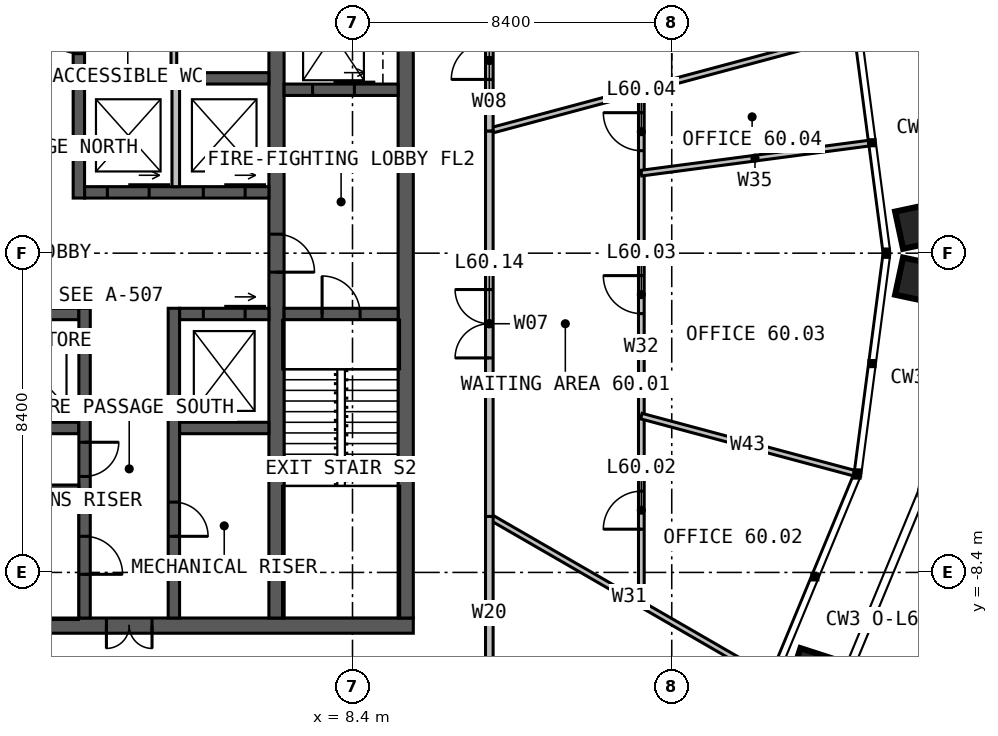
"""IFC4 building model, lengths in metres.
Left out: names, types, materials, properties, quantities, classifications, styles, units other than length and angle.
Written with IfcOpenShell. Run it as: python <this file> out.ifc"""

import sys

from ifc_helpers import new_model, si_unit, direction, frame, frame_2d, origin, place, context, subcontext, project, spatial, rectangle, extrude, element, fill, save


model = new_model("IFC4")
c1 = context("Model", 3, precision=1e-05, world=origin(), true_north=direction((0.0, 1.0)))
c2 = subcontext(c1, "Body", "Model", "MODEL_VIEW")
j1 = project(units=[si_unit("LENGTHUNIT", "METRE"), si_unit("PLANEANGLEUNIT", "RADIAN")], contexts=[c1])
p1 = place(None, origin())
s1 = spatial("IfcSite", under=j1, at=p1, CompositionType="ELEMENT")
p2 = place(p1, origin())
s2 = spatial("IfcBuilding", under=s1, at=p2, CompositionType="ELEMENT")
p3 = place(p2, frame((0.0, 0.0, 248.0)))
s3 = spatial("IfcBuildingStorey", under=s2, at=p3, CompositionType="ELEMENT", Elevation=248.0)
p4 = place(p3, frame((10.0, -9.8, 0.0), z_axis=(0.0, 0.0, 1.0), x_axis=(-1.0, 0.0, 0.0)))
e1 = element("IfcWall", 1, at=p4, inside=s3, PredefinedType="SOLIDWALL", context=c2, shape_type="SweptSolid", body=[
    extrude(rectangle(XDim=20.0, YDim=0.4, at=frame_2d((10.0, 0.0))), origin(), (0.0, 0.0, 1.0), 4.0),
])
p5 = place(p4, frame((6.875, 0.0, 0.0)))
e2 = element("IfcOpeningElement", 2, at=p5, cuts=e1, PredefinedType="OPENING", context=c2, shape_type="SweptSolid", body=[
    extrude(rectangle(XDim=1.2, YDim=2.2, at=frame_2d((0.6, 1.1))), frame((0.0, 0.21, 0.0), z_axis=(0.0, -1.0, 0.0), x_axis=(1.0, 0.0, 0.0)), (0.0, 0.0, 1.0), 0.42),
])
p6 = place(p3, frame((9.8, -9.6, 0.0), z_axis=(0.0, 0.0, 1.0), x_axis=(0.0, 1.0, 0.0)))
e3 = element("IfcWall", 3, at=p6, inside=s3, PredefinedType="SOLIDWALL", context=c2, shape_type="SweptSolid", body=[
    extrude(rectangle(XDim=19.2, YDim=0.4, at=frame_2d((9.6, 0.0))), origin(), (0.0, 0.0, 1.0), 4.0),
])
p7 = place(p3, frame((6.4, 9.6, 0.0), z_axis=(0.0, 0.0, 1.0), x_axis=(0.0, -1.0, 0.0)))
e4 = element("IfcWall", 4, at=p7, inside=s3, PredefinedType="SOLIDWALL", context=c2, shape_type="SweptSolid", body=[
    extrude(rectangle(XDim=19.2, YDim=0.4, at=frame_2d((9.6, 0.0))), origin(), (0.0, 0.0, 1.0), 4.0),
])
p8 = place(p7, frame((9.1, 0.0, 0.0)))
e5 = element("IfcOpeningElement", 5, at=p8, cuts=e4, PredefinedType="OPENING", context=c2, shape_type="SweptSolid", body=[
    extrude(rectangle(XDim=1.0, YDim=2.2, at=frame_2d((0.5, 1.1))), frame((0.0, 0.21, 0.0), z_axis=(0.0, -1.0, 0.0), x_axis=(1.0, 0.0, 0.0)), (0.0, 0.0, 1.0), 0.42),
])
p9 = place(p3, frame((1.35, 1.6, 0.0), z_axis=(0.0, 0.0, 1.0), x_axis=(1.0, 0.0, 0.0)))
e6 = element("IfcWall", 6, at=p9, inside=s3, PredefinedType="SOLIDWALL", context=c2, shape_type="SweptSolid", body=[
    extrude(rectangle(XDim=4.85, YDim=0.3, at=frame_2d((2.425, 0.0))), origin(), (0.0, 0.0, 1.0), 4.0),
])
p10 = place(p9, frame((0.6, 0.0, 0.0)))
e7 = element("IfcOpeningElement", 7, at=p10, cuts=e6, PredefinedType="OPENING", context=c2, shape_type="SweptSolid", body=[
    extrude(rectangle(XDim=1.1, YDim=2.2, at=frame_2d((0.55, 1.1))), frame((0.0, 0.16, 0.0), z_axis=(0.0, -1.0, 0.0), x_axis=(1.0, 0.0, 0.0)), (0.0, 0.0, 1.0), 0.32),
])
p11 = place(p9, frame((3.125, 0.0, 0.0)))
e8 = element("IfcOpeningElement", 8, at=p11, cuts=e6, PredefinedType="OPENING", context=c2, shape_type="SweptSolid", body=[
    extrude(rectangle(XDim=1.1, YDim=2.2, at=frame_2d((0.55, 1.1))), frame((0.0, 0.16, 0.0), z_axis=(0.0, -1.0, 0.0), x_axis=(1.0, 0.0, 0.0)), (0.0, 0.0, 1.0), 0.32),
])
p12 = place(p3, frame((1.35, 4.6, 0.0), z_axis=(0.0, 0.0, 1.0), x_axis=(1.0, 0.0, 0.0)))
e9 = element("IfcWall", 9, at=p12, inside=s3, PredefinedType="SOLIDWALL", context=c2, shape_type="SweptSolid", body=[
    extrude(rectangle(XDim=4.85, YDim=0.3, at=frame_2d((2.425, 0.0))), origin(), (0.0, 0.0, 1.0), 4.0),
])
p13 = place(p3, frame((1.2, 1.45, 0.0), z_axis=(0.0, 0.0, 1.0), x_axis=(0.0, 1.0, 0.0)))
e10 = element("IfcWall", 10, at=p13, inside=s3, PredefinedType="SOLIDWALL", context=c2, shape_type="SweptSolid", body=[
    extrude(rectangle(XDim=8.15, YDim=0.3, at=frame_2d((4.075, 0.0))), origin(), (0.0, 0.0, 1.0), 4.0),
])
p14 = place(p13, frame((3.8, 0.0, 0.0)))
e11 = element("IfcOpeningElement", 11, at=p14, cuts=e10, PredefinedType="OPENING", context=c2, shape_type="SweptSolid", body=[
    extrude(rectangle(XDim=1.0, YDim=2.2, at=frame_2d((0.5, 1.1))), frame((0.0, 0.16, 0.0), z_axis=(0.0, -1.0, 0.0), x_axis=(1.0, 0.0, 0.0)), (0.0, 0.0, 1.0), 0.32),
])
p15 = place(p13, frame((6.15, 0.0, 0.0)))
e12 = element("IfcOpeningElement", 12, at=p15, cuts=e10, PredefinedType="OPENING", context=c2, shape_type="SweptSolid", body=[
    extrude(rectangle(XDim=1.0, YDim=2.2, at=frame_2d((0.5, 1.1))), frame((0.0, 0.16, 0.0), z_axis=(0.0, -1.0, 0.0), x_axis=(1.0, 0.0, 0.0)), (0.0, 0.0, 1.0), 0.32),
])
p16 = place(p3, frame((-6.2, -1.6, 0.0), z_axis=(0.0, 0.0, 1.0), x_axis=(1.0, 0.0, 0.0)))
e13 = element("IfcWall", 13, at=p16, inside=s3, PredefinedType="SOLIDWALL", context=c2, shape_type="SweptSolid", body=[
    extrude(rectangle(XDim=7.4, YDim=0.3, at=frame_2d((3.7, 0.0))), origin(), (0.0, 0.0, 1.0), 4.0),
])
p17 = place(p16, frame((0.675, 0.0, 0.0)))
e14 = element("IfcOpeningElement", 14, at=p17, cuts=e13, PredefinedType="OPENING", context=c2, shape_type="SweptSolid", body=[
    extrude(rectangle(XDim=1.0, YDim=2.2, at=frame_2d((0.5, 1.1))), frame((0.0, 0.16, 0.0), z_axis=(0.0, -1.0, 0.0), x_axis=(1.0, 0.0, 0.0)), (0.0, 0.0, 1.0), 0.32),
])
p18 = place(p16, frame((2.225, 0.0, 0.0)))
e15 = element("IfcOpeningElement", 15, at=p18, cuts=e13, PredefinedType="OPENING", context=c2, shape_type="SweptSolid", body=[
    extrude(rectangle(XDim=1.0, YDim=2.2, at=frame_2d((0.5, 1.1))), frame((0.0, 0.16, 0.0), z_axis=(0.0, -1.0, 0.0), x_axis=(1.0, 0.0, 0.0)), (0.0, 0.0, 1.0), 0.32),
])
p19 = place(p16, frame((3.695, 0.0, 0.0)))
e16 = element("IfcOpeningElement", 16, at=p19, cuts=e13, PredefinedType="OPENING", context=c2, shape_type="SweptSolid", body=[
    extrude(rectangle(XDim=1.0, YDim=2.2, at=frame_2d((0.5, 1.1))), frame((0.0, 0.16, 0.0), z_axis=(0.0, -1.0, 0.0), x_axis=(1.0, 0.0, 0.0)), (0.0, 0.0, 1.0), 0.32),
])
p20 = place(p3, frame((3.85, -1.6, 0.0), z_axis=(0.0, 0.0, 1.0), x_axis=(1.0, 0.0, 0.0)))
e17 = element("IfcWall", 17, at=p20, inside=s3, PredefinedType="SOLIDWALL", context=c2, shape_type="SweptSolid", body=[
    extrude(rectangle(XDim=2.35, YDim=0.3, at=frame_2d((1.175, 0.0))), origin(), (0.0, 0.0, 1.0), 4.0),
])
p21 = place(p20, frame((0.625, 0.0, 0.0)))
e18 = element("IfcOpeningElement", 18, at=p21, cuts=e17, PredefinedType="OPENING", context=c2, shape_type="SweptSolid", body=[
    extrude(rectangle(XDim=1.1, YDim=2.2, at=frame_2d((0.55, 1.1))), frame((0.0, 0.16, 0.0), z_axis=(0.0, -1.0, 0.0), x_axis=(1.0, 0.0, 0.0)), (0.0, 0.0, 1.0), 0.32),
])
p22 = place(p3, frame((-6.2, -4.6, 0.0), z_axis=(0.0, 0.0, 1.0), x_axis=(1.0, 0.0, 0.0)))
e19 = element("IfcWall", 19, at=p22, inside=s3, PredefinedType="SOLIDWALL", context=c2, shape_type="SweptSolid", body=[
    extrude(rectangle(XDim=7.4, YDim=0.3, at=frame_2d((3.7, 0.0))), origin(), (0.0, 0.0, 1.0), 4.0),
])
p23 = place(p3, frame((3.85, -4.6, 0.0), z_axis=(0.0, 0.0, 1.0), x_axis=(1.0, 0.0, 0.0)))
e20 = element("IfcWall", 20, at=p23, inside=s3, PredefinedType="SOLIDWALL", context=c2, shape_type="SweptSolid", body=[
    extrude(rectangle(XDim=2.35, YDim=0.3, at=frame_2d((1.175, 0.0))), origin(), (0.0, 0.0, 1.0), 4.0),
])
p24 = place(p3, frame((1.35, -1.45, 0.0), z_axis=(0.0, 0.0, 1.0), x_axis=(0.0, -1.0, 0.0)))
e21 = element("IfcWall", 21, at=p24, inside=s3, PredefinedType="SOLIDWALL", context=c2, shape_type="SweptSolid", body=[
    extrude(rectangle(XDim=8.15, YDim=0.3, at=frame_2d((4.075, 0.0))), origin(), (0.0, 0.0, 1.0), 4.0),
])
p25 = place(p24, frame((6.0, 0.0, 0.0)))
e22 = element("IfcOpeningElement", 22, at=p25, cuts=e21, PredefinedType="OPENING", context=c2, shape_type="SweptSolid", body=[
    extrude(rectangle(XDim=1.0, YDim=2.2, at=frame_2d((0.5, 1.1))), frame((0.0, 0.16, 0.0), z_axis=(0.0, -1.0, 0.0), x_axis=(1.0, 0.0, 0.0)), (0.0, 0.0, 1.0), 0.32),
])
p26 = place(p24, frame((3.525, 0.0, 0.0)))
e23 = element("IfcOpeningElement", 23, at=p26, cuts=e21, PredefinedType="OPENING", context=c2, shape_type="SweptSolid", body=[
    extrude(rectangle(XDim=0.9, YDim=2.2, at=frame_2d((0.45, 1.1))), frame((0.0, 0.16, 0.0), z_axis=(0.0, -1.0, 0.0), x_axis=(1.0, 0.0, 0.0)), (0.0, 0.0, 1.0), 0.32),
])
p27 = place(p3, frame((3.7, -1.45, 0.0), z_axis=(0.0, 0.0, 1.0), x_axis=(0.0, -1.0, 0.0)))
e24 = element("IfcWall", 24, at=p27, inside=s3, PredefinedType="SOLIDWALL", context=c2, shape_type="SweptSolid", body=[
    extrude(rectangle(XDim=8.15, YDim=0.3, at=frame_2d((4.075, 0.0))), origin(), (0.0, 0.0, 1.0), 4.0),
])
p28 = place(p27, frame((5.1, 0.0, 0.0)))
e25 = element("IfcOpeningElement", 25, at=p28, cuts=e24, PredefinedType="OPENING", context=c2, shape_type="SweptSolid", body=[
    extrude(rectangle(XDim=0.9, YDim=2.2, at=frame_2d((0.45, 1.1))), frame((0.0, 0.16, 0.0), z_axis=(0.0, -1.0, 0.0), x_axis=(1.0, 0.0, 0.0)), (0.0, 0.0, 1.0), 0.32),
])
p29 = place(p3, frame((-6.2, -6.2, 0.0), z_axis=(0.0, 0.0, 1.0), x_axis=(1.0, 0.0, 0.0)))
e26 = element("IfcWall", 26, at=p29, inside=s3, PredefinedType="SOLIDWALL", context=c2, shape_type="SweptSolid", body=[
    extrude(rectangle(XDim=7.4, YDim=0.2, at=frame_2d((3.7, 0.0))), origin(), (0.0, 0.0, 1.0), 4.0),
])
p30 = place(p3, frame((6.6, -1.6, 0.0), z_axis=(0.0, 0.0, 1.0), x_axis=(1.0, 0.0, 0.0)))
e27 = element("IfcWall", 27, at=p30, inside=s3, PredefinedType="SOLIDWALL", context=c2, shape_type="SweptSolid", body=[
    extrude(rectangle(XDim=3.0, YDim=0.3, at=frame_2d((1.5, 0.0))), origin(), (0.0, 0.0, 1.0), 4.0),
])
p31 = place(p30, frame((1.0, 0.0, 0.0)))
e28 = element("IfcOpeningElement", 28, at=p31, cuts=e27, PredefinedType="OPENING", context=c2, shape_type="SweptSolid", body=[
    extrude(rectangle(XDim=1.0, YDim=2.2, at=frame_2d((0.5, 1.1))), frame((0.0, 0.16, 0.0), z_axis=(0.0, -1.0, 0.0), x_axis=(1.0, 0.0, 0.0)), (0.0, 0.0, 1.0), 0.32),
])
p32 = place(p3, frame((6.6, 4.3, 0.0), z_axis=(0.0, 0.0, 1.0), x_axis=(1.0, 0.0, 0.0)))
e29 = element("IfcWall", 29, at=p32, inside=s3, PredefinedType="SOLIDWALL", context=c2, shape_type="SweptSolid", body=[
    extrude(rectangle(XDim=3.0, YDim=0.3, at=frame_2d((1.5, 0.0))), origin(), (0.0, 0.0, 1.0), 4.0),
])
p33 = place(p32, frame((0.75, 0.0, 0.0)))
e30 = element("IfcOpeningElement", 30, at=p33, cuts=e29, PredefinedType="OPENING", context=c2, shape_type="SweptSolid", body=[
    extrude(rectangle(XDim=1.1, YDim=2.2, at=frame_2d((0.55, 1.1))), frame((0.0, 0.16, 0.0), z_axis=(0.0, -1.0, 0.0), x_axis=(1.0, 0.0, 0.0)), (0.0, 0.0, 1.0), 0.32),
])
p34 = place(p3, frame((3.75, 1.75, 0.0), z_axis=(0.0, 0.0, 1.0), x_axis=(0.0, 1.0, 0.0)))
e31 = element("IfcWall", 31, at=p34, inside=s3, PredefinedType="SOLIDWALL", context=c2, shape_type="SweptSolid", body=[
    extrude(rectangle(XDim=2.7, YDim=0.2, at=frame_2d((1.35, 0.0))), origin(), (0.0, 0.0, 1.0), 3.75),
])
p35 = place(p3, frame((3.7, 4.75, 0.0), z_axis=(0.0, 0.0, 1.0), x_axis=(0.0, 1.0, 0.0)))
e32 = element("IfcWall", 32, at=p35, inside=s3, PredefinedType="PARTITIONING", context=c2, shape_type="SweptSolid", body=[
    extrude(rectangle(XDim=1.975, YDim=0.15, at=frame_2d((0.988, 0.0))), origin(), (0.0, 0.0, 1.0), 3.75),
])
p36 = place(p3, frame((12.0, -6.928, 0.0), z_axis=(0.0, 0.0, 1.0), x_axis=(0.866026401553, -0.49999827181, 0.0)))
e33 = element("IfcWall", 33, at=p36, inside=s3, PredefinedType="PARTITIONING", context=c2, shape_type="SweptSolid", body=[
    extrude(rectangle(XDim=8.505, YDim=0.15, at=frame_2d((4.252, 0.0))), origin(), (0.0, 0.0, 1.0), 2.79),
])
p37 = place(p3, frame((12.0, 3.215, 0.0), z_axis=(0.0, 0.0, 1.0), x_axis=(0.965922720407, 0.258830636135, 0.0)))
e34 = element("IfcWall", 34, at=p37, inside=s3, PredefinedType="PARTITIONING", context=c2, shape_type="SweptSolid", body=[
    extrude(rectangle(XDim=9.938, YDim=0.15, at=frame_2d((4.969, 0.0))), origin(), (0.0, 0.0, 1.0), 2.79),
])
p38 = place(p3, frame((16.0, -9.238, 0.0), z_axis=(0.0, 0.0, 1.0), x_axis=(0.0, 1.0, 0.0)))
e35 = element("IfcWall", 35, at=p38, inside=s3, PredefinedType="PARTITIONING", context=c2, shape_type="SweptSolid", body=[
    extrude(rectangle(XDim=13.525, YDim=0.15, at=frame_2d((6.762, 0.0))), origin(), (0.0, 0.0, 1.0), 2.79),
])
p39 = place(p38, frame((1.975, 0.0, 0.0)))
e36 = element("IfcOpeningElement", 36, at=p39, cuts=e35, PredefinedType="OPENING", context=c2, shape_type="SweptSolid", body=[
    extrude(rectangle(XDim=1.0, YDim=2.2, at=frame_2d((0.5, 1.1))), frame((0.0, 0.085, 0.0), z_axis=(0.0, -1.0, 0.0), x_axis=(1.0, 0.0, 0.0)), (0.0, 0.0, 1.0), 0.17),
])
p40 = place(p38, frame((7.647, 0.0, 0.0)))
e37 = element("IfcOpeningElement", 37, at=p40, cuts=e35, PredefinedType="OPENING", context=c2, shape_type="SweptSolid", body=[
    extrude(rectangle(XDim=1.0, YDim=2.2, at=frame_2d((0.5, 1.1))), frame((0.0, 0.085, 0.0), z_axis=(0.0, -1.0, 0.0), x_axis=(1.0, 0.0, 0.0)), (0.0, 0.0, 1.0), 0.17),
])
p41 = place(p38, frame((11.934, 0.0, 0.0)))
e38 = element("IfcOpeningElement", 38, at=p41, cuts=e35, PredefinedType="OPENING", context=c2, shape_type="SweptSolid", body=[
    extrude(rectangle(XDim=1.0, YDim=2.2, at=frame_2d((0.5, 1.1))), frame((0.0, 0.085, 0.0), z_axis=(0.0, -1.0, 0.0), x_axis=(1.0, 0.0, 0.0)), (0.0, 0.0, 1.0), 0.17),
])
p42 = place(p3, frame((16.0, -4.287, 0.0), z_axis=(0.0, 0.0, 1.0), x_axis=(0.96591966376, -0.258842042881, 0.0)))
e39 = element("IfcWall", 39, at=p42, inside=s3, PredefinedType="PARTITIONING", context=c2, shape_type="SweptSolid", body=[
    extrude(rectangle(XDim=5.797, YDim=0.15, at=frame_2d((2.898, 0.0))), origin(), (0.0, 0.0, 1.0), 2.79),
])
p43 = place(p3, frame((16.0, 2.106, 0.0), z_axis=(0.0, 0.0, 1.0), x_axis=(0.991443960057, 0.130533038219, 0.0)))
e40 = element("IfcWall", 40, at=p43, inside=s3, PredefinedType="PARTITIONING", context=c2, shape_type="SweptSolid", body=[
    extrude(rectangle(XDim=6.032, YDim=0.15, at=frame_2d((3.016, 0.0))), origin(), (0.0, 0.0, 1.0), 2.79),
])
p44 = place(p3, frame((12.0, -6.928, 0.0), z_axis=(0.0, 0.0, 1.0), x_axis=(0.0, 1.0, 0.0)))
e41 = element("IfcWall", 41, at=p44, inside=s3, PredefinedType="PARTITIONING", context=c2, shape_type="SweptSolid", body=[
    extrude(rectangle(XDim=10.144, YDim=0.2, at=frame_2d((5.072, 0.0))), origin(), (0.0, 0.0, 1.0), 3.8),
])
p45 = place(p44, frame((4.172, 0.0, 0.0)))
e42 = element("IfcOpeningElement", 42, at=p45, cuts=e41, PredefinedType="OPENING", context=c2, shape_type="SweptSolid", body=[
    extrude(rectangle(XDim=1.8, YDim=2.2, at=frame_2d((0.9, 1.1))), frame((0.0, 0.11, 0.0), z_axis=(0.0, -1.0, 0.0), x_axis=(1.0, 0.0, 0.0)), (0.0, 0.0, 1.0), 0.22),
])
p46 = place(p3, frame((12.0, 3.215, 0.0), z_axis=(0.0, 0.0, 1.0), x_axis=(0.0, 1.0, 0.0)))
e43 = element("IfcWall", 43, at=p46, inside=s3, PredefinedType="PARTITIONING", context=c2, shape_type="SweptSolid", body=[
    extrude(rectangle(XDim=3.713, YDim=0.2, at=frame_2d((1.856, 0.0))), origin(), (0.0, 0.0, 1.0), 3.8),
])
p47 = place(p46, frame((1.356, 0.0, 0.0)))
e44 = element("IfcOpeningElement", 44, at=p47, cuts=e43, PredefinedType="OPENING", context=c2, shape_type="SweptSolid", body=[
    extrude(rectangle(XDim=1.0, YDim=2.2, at=frame_2d((0.5, 1.1))), frame((0.0, 0.11, 0.0), z_axis=(0.0, -1.0, 0.0), x_axis=(1.0, 0.0, 0.0)), (0.0, 0.0, 1.0), 0.22),
])
p48 = place(p3, frame((12.0, -12.0, 0.0), z_axis=(0.0, 0.0, 1.0), x_axis=(0.0, 1.0, 0.0)))
e45 = element("IfcWall", 45, at=p48, inside=s3, PredefinedType="PARTITIONING", context=c2, shape_type="SweptSolid", body=[
    extrude(rectangle(XDim=5.072, YDim=0.2, at=frame_2d((2.536, 0.0))), origin(), (0.0, 0.0, 1.0), 3.8),
])
p49 = place(p5, origin())
e46 = element("IfcDoor", 46, at=p49, inside=s3, OperationType="DOUBLE_DOOR_SINGLE_SWING", PredefinedType="DOOR", context=c2, shape_type="SweptSolid", body=[
    extrude(rectangle(XDim=1.2, YDim=2.2, at=frame_2d((0.6, 1.1))), frame((0.0, 0.025, 0.0), z_axis=(0.0, -1.0, 0.0), x_axis=(1.0, 0.0, 0.0)), (0.0, 0.0, 1.0), 0.05),
])
fill(e2, e46)
p50 = place(p8, origin())
e47 = element("IfcDoor", 47, at=p50, inside=s3, OperationType="SINGLE_SWING_RIGHT", PredefinedType="DOOR", context=c2, shape_type="SweptSolid", body=[
    extrude(rectangle(XDim=1.0, YDim=2.2, at=frame_2d((0.5, 1.1))), frame((0.0, 0.025, 0.0), z_axis=(0.0, -1.0, 0.0), x_axis=(1.0, 0.0, 0.0)), (0.0, 0.0, 1.0), 0.05),
])
fill(e5, e47)
p51 = place(p31, origin())
e48 = element("IfcDoor", 48, at=p51, inside=s3, OperationType="SINGLE_SWING_LEFT", PredefinedType="DOOR", context=c2, shape_type="SweptSolid", body=[
    extrude(rectangle(XDim=1.0, YDim=2.2, at=frame_2d((0.5, 1.1))), frame((0.0, 0.025, 0.0), z_axis=(0.0, -1.0, 0.0), x_axis=(1.0, 0.0, 0.0)), (0.0, 0.0, 1.0), 0.05),
])
fill(e28, e48)
p52 = place(p25, origin())
e49 = element("IfcDoor", 49, at=p52, inside=s3, OperationType="SINGLE_SWING_RIGHT", PredefinedType="DOOR", context=c2, shape_type="SweptSolid", body=[
    extrude(rectangle(XDim=1.0, YDim=2.2, at=frame_2d((0.5, 1.1))), frame((0.0, 0.025, 0.0), z_axis=(0.0, -1.0, 0.0), x_axis=(1.0, 0.0, 0.0)), (0.0, 0.0, 1.0), 0.05),
])
fill(e22, e49)
p53 = place(p14, origin())
e50 = element("IfcDoor", 50, at=p53, inside=s3, OperationType="SINGLE_SWING_RIGHT", PredefinedType="DOOR", context=c2, shape_type="SweptSolid", body=[
    extrude(rectangle(XDim=1.0, YDim=2.2, at=frame_2d((0.5, 1.1))), frame((0.0, 0.025, 0.0), z_axis=(0.0, -1.0, 0.0), x_axis=(1.0, 0.0, 0.0)), (0.0, 0.0, 1.0), 0.05),
])
fill(e11, e50)
p54 = place(p26, origin())
e51 = element("IfcDoor", 51, at=p54, inside=s3, OperationType="SINGLE_SWING_LEFT", PredefinedType="DOOR", context=c2, shape_type="SweptSolid", body=[
    extrude(rectangle(XDim=0.9, YDim=2.2, at=frame_2d((0.45, 1.1))), frame((0.0, 0.025, 0.0), z_axis=(0.0, -1.0, 0.0), x_axis=(1.0, 0.0, 0.0)), (0.0, 0.0, 1.0), 0.05),
])
fill(e23, e51)
p55 = place(p28, origin())
e52 = element("IfcDoor", 52, at=p55, inside=s3, OperationType="SINGLE_SWING_RIGHT", PredefinedType="DOOR", context=c2, shape_type="SweptSolid", body=[
    extrude(rectangle(XDim=0.9, YDim=2.2, at=frame_2d((0.45, 1.1))), frame((0.0, 0.025, 0.0), z_axis=(0.0, -1.0, 0.0), x_axis=(1.0, 0.0, 0.0)), (0.0, 0.0, 1.0), 0.05),
])
fill(e25, e52)
p56 = place(p10, origin())
e53 = element("IfcDoor", 53, at=p56, inside=s3, OperationType="SLIDING_TO_LEFT", PredefinedType="DOOR", context=c2, shape_type="SweptSolid", body=[
    extrude(rectangle(XDim=1.1, YDim=2.2, at=frame_2d((0.55, 1.1))), frame((0.0, 0.025, 0.0), z_axis=(0.0, -1.0, 0.0), x_axis=(1.0, 0.0, 0.0)), (0.0, 0.0, 1.0), 0.05),
])
fill(e7, e53)
p57 = place(p11, origin())
e54 = element("IfcDoor", 54, at=p57, inside=s3, OperationType="SLIDING_TO_LEFT", PredefinedType="DOOR", context=c2, shape_type="SweptSolid", body=[
    extrude(rectangle(XDim=1.1, YDim=2.2, at=frame_2d((0.55, 1.1))), frame((0.0, 0.025, 0.0), z_axis=(0.0, -1.0, 0.0), x_axis=(1.0, 0.0, 0.0)), (0.0, 0.0, 1.0), 0.05),
])
fill(e8, e54)
p58 = place(p21, origin())
e55 = element("IfcDoor", 55, at=p58, inside=s3, OperationType="SLIDING_TO_LEFT", PredefinedType="DOOR", context=c2, shape_type="SweptSolid", body=[
    extrude(rectangle(XDim=1.1, YDim=2.2, at=frame_2d((0.55, 1.1))), frame((0.0, 0.025, 0.0), z_axis=(0.0, -1.0, 0.0), x_axis=(1.0, 0.0, 0.0)), (0.0, 0.0, 1.0), 0.05),
])
fill(e18, e55)
p59 = place(p33, origin())
e56 = element("IfcDoor", 56, at=p59, inside=s3, OperationType="SLIDING_TO_LEFT", PredefinedType="DOOR", context=c2, shape_type="SweptSolid", body=[
    extrude(rectangle(XDim=1.1, YDim=2.2, at=frame_2d((0.55, 1.1))), frame((0.0, 0.025, 0.0), z_axis=(0.0, -1.0, 0.0), x_axis=(1.0, 0.0, 0.0)), (0.0, 0.0, 1.0), 0.05),
])
fill(e30, e56)
p60 = place(p39, origin())
e57 = element("IfcDoor", 57, at=p60, inside=s3, OperationType="SINGLE_SWING_LEFT", PredefinedType="DOOR", context=c2, shape_type="SweptSolid", body=[
    extrude(rectangle(XDim=1.0, YDim=2.2, at=frame_2d((0.5, 1.1))), frame((0.0, 0.025, 0.0), z_axis=(0.0, -1.0, 0.0), x_axis=(1.0, 0.0, 0.0)), (0.0, 0.0, 1.0), 0.05),
])
fill(e36, e57)
p61 = place(p40, origin())
e58 = element("IfcDoor", 58, at=p61, inside=s3, OperationType="SINGLE_SWING_RIGHT", PredefinedType="DOOR", context=c2, shape_type="SweptSolid", body=[
    extrude(rectangle(XDim=1.0, YDim=2.2, at=frame_2d((0.5, 1.1))), frame((0.0, 0.025, 0.0), z_axis=(0.0, -1.0, 0.0), x_axis=(1.0, 0.0, 0.0)), (0.0, 0.0, 1.0), 0.05),
])
fill(e37, e58)
p62 = place(p41, origin())
e59 = element("IfcDoor", 59, at=p62, inside=s3, OperationType="SINGLE_SWING_RIGHT", PredefinedType="DOOR", context=c2, shape_type="SweptSolid", body=[
    extrude(rectangle(XDim=1.0, YDim=2.2, at=frame_2d((0.5, 1.1))), frame((0.0, 0.025, 0.0), z_axis=(0.0, -1.0, 0.0), x_axis=(1.0, 0.0, 0.0)), (0.0, 0.0, 1.0), 0.05),
])
fill(e38, e59)
p63 = place(p45, origin())
e60 = element("IfcDoor", 60, at=p63, inside=s3, OperationType="DOUBLE_DOOR_SINGLE_SWING", PredefinedType="DOOR", context=c2, shape_type="SweptSolid", body=[
    extrude(rectangle(XDim=1.8, YDim=2.2, at=frame_2d((0.9, 1.1))), frame((0.0, 0.025, 0.0), z_axis=(0.0, -1.0, 0.0), x_axis=(1.0, 0.0, 0.0)), (0.0, 0.0, 1.0), 0.05),
])
fill(e42, e60)
p64 = place(p47, origin())
e61 = element("IfcDoor", 61, at=p64, inside=s3, OperationType="SINGLE_SWING_LEFT", PredefinedType="DOOR", context=c2, shape_type="SweptSolid", body=[
    extrude(rectangle(XDim=1.0, YDim=2.2, at=frame_2d((0.5, 1.1))), frame((0.0, 0.025, 0.0), z_axis=(0.0, -1.0, 0.0), x_axis=(1.0, 0.0, 0.0)), (0.0, 0.0, 1.0), 0.05),
])
fill(e44, e61)
save(model, sys.argv[1])
